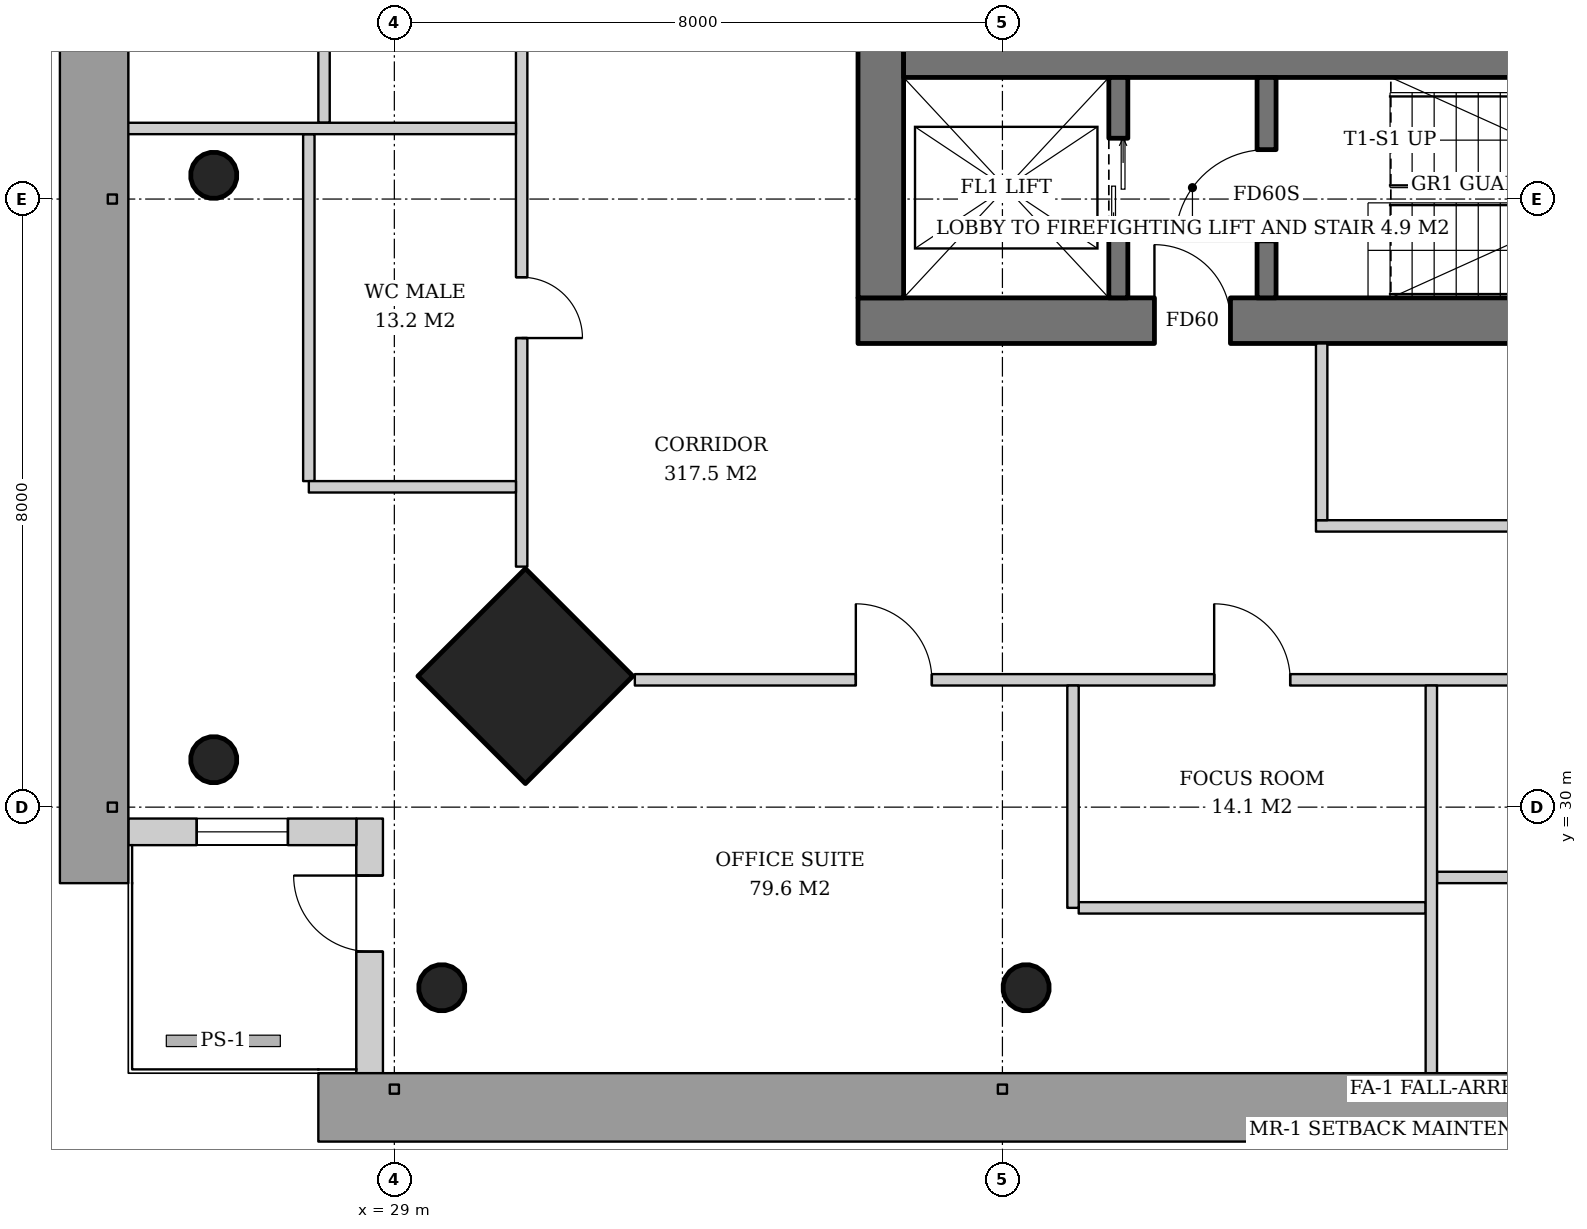
"""IFC4 building model, lengths in metres.
Left out: names, types, materials, properties, quantities, classifications, styles, units other than length and angle.
Written with IfcOpenShell. Run it as: python <this file> out.ifc"""

import sys

from ifc_helpers import new_model, si_unit, direction, frame, frame_2d, origin, origin_2d, place, context, subcontext, project, spatial, rectangle, hollow_circle, extrude, element, fill, save


model = new_model("IFC4")
c1 = context("Model", 3, precision=1e-05, world=origin(), true_north=direction((0.0, 1.0)))
c2 = subcontext(c1, "Body", "Model", "MODEL_VIEW")
j1 = project(units=[si_unit("LENGTHUNIT", "METRE"), si_unit("PLANEANGLEUNIT", "RADIAN")], contexts=[c1])
p1 = place(None, origin())
s1 = spatial("IfcSite", under=j1, at=p1, CompositionType="ELEMENT")
p2 = place(p1, origin())
s2 = spatial("IfcBuilding", under=s1, at=p2, CompositionType="ELEMENT")
p3 = place(p2, frame((0.0, 0.0, 195.8)))
s3 = spatial("IfcBuildingStorey", under=s2, at=p3, CompositionType="ELEMENT", Elevation=195.8)
p4 = place(p3, frame((30.686, 31.686, 0.0), z_axis=(0.031898107953, 0.031898107953, 0.998981992539), x_axis=(-0.707106781187, 0.707106781187, 0.0)))
e1 = element("IfcColumn", 1, at=p4, inside=s3, PredefinedType="COLUMN", context=c2, shape_type="SweptSolid", body=[
    extrude(rectangle(XDim=2.0, YDim=2.0, at=origin_2d()), origin(), (0.0, 0.0, 1.0), 3.804),
])
p5 = place(p3, frame((26.586, 30.586, 0.0), z_axis=(0.031898107953, 0.031898107953, 0.998981992539), x_axis=(-0.707106781187, 0.707106781187, 0.0)))
e2 = element("IfcColumn", 2, at=p5, inside=s3, PredefinedType="COLUMN", context=c2, shape_type="SweptSolid", body=[
    extrude(hollow_circle(Radius=0.305, WallThickness=0.025, at=origin_2d()), origin(), (0.0, 0.0, 1.0), 3.804),
])
p6 = place(p3, frame((26.586, 38.293, 0.0), z_axis=(0.031910302246, 0.015923048203, 0.999363892257), x_axis=(-0.446493300058, 0.894786976326, 0.0)))
e3 = element("IfcColumn", 3, at=p6, inside=s3, PredefinedType="COLUMN", context=c2, shape_type="SweptSolid", body=[
    extrude(hollow_circle(Radius=0.305, WallThickness=0.025, at=origin_2d()), origin(), (0.0, 0.0, 1.0), 3.802),
])
p7 = place(p3, frame((29.586, 27.586, 0.0), z_axis=(0.031898107953, 0.031898107953, 0.998981992539), x_axis=(-0.707106781187, 0.707106781187, 0.0)))
e4 = element("IfcColumn", 4, at=p7, inside=s3, PredefinedType="COLUMN", context=c2, shape_type="SweptSolid", body=[
    extrude(hollow_circle(Radius=0.305, WallThickness=0.025, at=origin_2d()), origin(), (0.0, 0.0, 1.0), 3.804),
])
p8 = place(p3, frame((37.293, 27.586, 0.0), z_axis=(0.015923048203, 0.031910302246, 0.999363892257), x_axis=(-0.894786976326, 0.446493300058, 0.0)))
e5 = element("IfcColumn", 5, at=p8, inside=s3, PredefinedType="COLUMN", context=c2, shape_type="SweptSolid", body=[
    extrude(hollow_circle(Radius=0.305, WallThickness=0.025, at=origin_2d()), origin(), (0.0, 0.0, 1.0), 3.802),
])
p9 = place(p3, frame((35.1, 36.4, 0.0), z_axis=(0.0, 0.0, 1.0), x_axis=(1.0, 0.0, 0.0)))
e6 = element("IfcWall", 6, at=p9, inside=s3, PredefinedType="SHEAR", context=c2, shape_type="SweptSolid", body=[
    extrude(rectangle(XDim=19.8, YDim=0.6, at=frame_2d((9.9, 0.0))), origin(), (0.0, 0.0, 1.0), 3.8),
])
p10 = place(p9, frame((3.9, 0.0, 0.0)))
e7 = element("IfcOpeningElement", 7, at=p10, cuts=e6, PredefinedType="OPENING", context=c2, shape_type="SweptSolid", body=[
    extrude(rectangle(XDim=1.0, YDim=2.1, at=frame_2d((0.5, 1.05))), frame((0.0, 0.31, 0.0), z_axis=(0.0, -1.0, 0.0), x_axis=(1.0, 0.0, 0.0)), (0.0, 0.0, 1.0), 0.62),
])
p11 = place(p9, frame((15.35, 0.0, 0.0)))
e8 = element("IfcOpeningElement", 8, at=p11, cuts=e6, PredefinedType="OPENING", context=c2, shape_type="SweptSolid", body=[
    extrude(rectangle(XDim=1.0, YDim=2.1, at=frame_2d((0.5, 1.05))), frame((0.0, 0.31, 0.0), z_axis=(0.0, -1.0, 0.0), x_axis=(1.0, 0.0, 0.0)), (0.0, 0.0, 1.0), 0.62),
])
p12 = place(p3, frame((35.4, 36.7, 0.0), z_axis=(0.0, 0.0, 1.0), x_axis=(0.0, 1.0, 0.0)))
e9 = element("IfcWall", 9, at=p12, inside=s3, PredefinedType="SHEAR", context=c2, shape_type="SweptSolid", body=[
    extrude(rectangle(XDim=18.6, YDim=0.6, at=frame_2d((9.3, 0.0))), origin(), (0.0, 0.0, 1.0), 3.8),
])
p13 = place(p12, frame((8.4, 0.0, 0.0)))
e10 = element("IfcOpeningElement", 10, at=p13, cuts=e9, PredefinedType="OPENING", context=c2, shape_type="SweptSolid", body=[
    extrude(rectangle(XDim=1.8, YDim=2.4, at=frame_2d((0.9, 1.2))), frame((0.0, 0.31, 0.0), z_axis=(0.0, -1.0, 0.0), x_axis=(1.0, 0.0, 0.0)), (0.0, 0.0, 1.0), 0.62),
])
p14 = place(p3, frame((35.7, 39.8, 0.0), z_axis=(0.0, 0.0, 1.0), x_axis=(1.0, 0.0, 0.0)))
e11 = element("IfcWall", 11, at=p14, inside=s3, PredefinedType="SHEAR", context=c2, shape_type="SweptSolid", body=[
    extrude(rectangle(XDim=18.6, YDim=0.4, at=frame_2d((9.3, 0.0))), origin(), (0.0, 0.0, 1.0), 3.8),
])
p15 = place(p3, frame((28.675, 26.5, 0.0), z_axis=(0.0, 0.0, 1.0), x_axis=(0.0, 1.0, 0.0)))
e12 = element("IfcWall", 12, at=p15, inside=s3, PredefinedType="SOLIDWALL", context=c2, shape_type="SweptSolid", body=[
    extrude(rectangle(XDim=3.35, YDim=0.35, at=frame_2d((1.675, 0.0))), origin(), (0.0, 0.0, 1.0), 3.62),
])
p16 = place(p15, frame((1.6, 0.0, 0.0)))
e13 = element("IfcOpeningElement", 13, at=p16, cuts=e12, PredefinedType="OPENING", context=c2, shape_type="SweptSolid", body=[
    extrude(rectangle(XDim=1.0, YDim=2.4, at=frame_2d((0.5, 1.2))), frame((0.0, 0.185, 0.0), z_axis=(0.0, -1.0, 0.0), x_axis=(1.0, 0.0, 0.0)), (0.0, 0.0, 1.0), 0.37),
])
p17 = place(p3, frame((28.5, 29.675, 0.0), z_axis=(0.0, 0.0, 1.0), x_axis=(-1.0, 0.0, 0.0)))
e14 = element("IfcWall", 14, at=p17, inside=s3, PredefinedType="SOLIDWALL", context=c2, shape_type="SweptSolid", body=[
    extrude(rectangle(XDim=3.0, YDim=0.35, at=frame_2d((1.5, 0.0))), origin(), (0.0, 0.0, 1.0), 3.62),
])
p18 = place(p17, frame((0.9, 0.0, 0.6)))
e15 = element("IfcOpeningElement", 15, at=p18, cuts=e14, PredefinedType="OPENING", context=c2, shape_type="SweptSolid", body=[
    extrude(rectangle(XDim=1.2, YDim=2.55, at=frame_2d((0.6, 1.275))), frame((0.0, 0.185, 0.0), z_axis=(0.0, -1.0, 0.0), x_axis=(1.0, 0.0, 0.0)), (0.0, 0.0, 1.0), 0.37),
])
p19 = place(p3, frame((38.525, 36.7, 0.0), z_axis=(0.0, 0.0, 1.0), x_axis=(0.0, 1.0, 0.0)))
e16 = element("IfcWall", 16, at=p19, inside=s3, PredefinedType="SHEAR", context=c2, shape_type="SweptSolid", body=[
    extrude(rectangle(XDim=2.9, YDim=0.25, at=frame_2d((1.45, 0.0))), origin(), (0.0, 0.0, 1.0), 3.8),
])
p20 = place(p19, frame((0.8, 0.0, 0.0)))
e17 = element("IfcOpeningElement", 17, at=p20, cuts=e16, PredefinedType="OPENING", context=c2, shape_type="SweptSolid", body=[
    extrude(rectangle(XDim=1.3, YDim=2.2, at=frame_2d((0.65, 1.1))), frame((0.0, 0.135, 0.0), z_axis=(0.0, -1.0, 0.0), x_axis=(1.0, 0.0, 0.0)), (0.0, 0.0, 1.0), 0.27),
])
p21 = place(p3, frame((40.475, 36.7, 0.0), z_axis=(0.0, 0.0, 1.0), x_axis=(0.0, 1.0, 0.0)))
e18 = element("IfcWall", 18, at=p21, inside=s3, PredefinedType="SHEAR", context=c2, shape_type="SweptSolid", body=[
    extrude(rectangle(XDim=2.9, YDim=0.25, at=frame_2d((1.45, 0.0))), origin(), (0.0, 0.0, 1.0), 3.8),
])
p22 = place(p21, frame((0.75, 0.0, 0.0)))
e19 = element("IfcOpeningElement", 19, at=p22, cuts=e18, PredefinedType="OPENING", context=c2, shape_type="SweptSolid", body=[
    extrude(rectangle(XDim=1.2, YDim=2.1, at=frame_2d((0.6, 1.05))), frame((0.0, 0.135, 0.0), z_axis=(0.0, -1.0, 0.0), x_axis=(1.0, 0.0, 0.0)), (0.0, 0.0, 1.0), 0.27),
])
p23 = place(p3, frame((41.125, 33.7, 0.0), z_axis=(0.0, 0.0, 1.0), x_axis=(1.0, 0.0, 0.0)))
e20 = element("IfcWall", 20, at=p23, inside=s3, PredefinedType="PARTITIONING", context=c2, shape_type="SweptSolid", body=[
    extrude(rectangle(XDim=8.2, YDim=0.15, at=frame_2d((4.1, 0.0))), origin(), (0.0, 0.0, 1.0), 2.867),
])
p24 = place(p23, frame((3.6, 0.0, 0.0)))
e21 = element("IfcOpeningElement", 21, at=p24, cuts=e20, PredefinedType="OPENING", context=c2, shape_type="SweptSolid", body=[
    extrude(rectangle(XDim=1.0, YDim=2.1, at=frame_2d((0.5, 1.05))), frame((0.0, 0.085, 0.0), z_axis=(0.0, -1.0, 0.0), x_axis=(1.0, 0.0, 0.0)), (0.0, 0.0, 1.0), 0.17),
])
p25 = place(p3, frame((41.2, 36.1, 0.0), z_axis=(0.0, 0.0, 1.0), x_axis=(0.0, -1.0, 0.0)))
e22 = element("IfcWall", 22, at=p25, inside=s3, PredefinedType="PARTITIONING", context=c2, shape_type="SweptSolid", body=[
    extrude(rectangle(XDim=2.325, YDim=0.15, at=frame_2d((1.163, 0.0))), origin(), (0.0, 0.0, 1.0), 3.62),
])
for number, where, z_axis, x_axis in (
    (23, (28.075, 43.568, 0.0), (0.0, 0.0, 1.0), (0.0, -1.0, 0.0)),
    (24, (27.875, 38.854, 0.0), (0.0, 0.0, 1.0), (0.0, -1.0, 0.0)),
):
    element("IfcWall", number, at=place(p3, frame(where, z_axis=z_axis, x_axis=x_axis)), inside=s3, PredefinedType="PARTITIONING", context=c2, shape_type="SweptSolid", body=[
        extrude(rectangle(XDim=4.564, YDim=0.15, at=frame_2d((2.282, 0.0))), origin(), (0.0, 0.0, 1.0), 2.867),
    ])
p26 = place(p3, frame((30.675, 58.836, 0.0), z_axis=(0.0, 0.0, 1.0), x_axis=(0.0, -1.0, 0.0)))
e25 = element("IfcWall", 25, at=p26, inside=s3, PredefinedType="PARTITIONING", context=c2, shape_type="SweptSolid", body=[
    extrude(rectangle(XDim=25.671, YDim=0.15, at=frame_2d((12.836, 0.0))), origin(), (0.0, 0.0, 1.0), 2.867),
])
p27 = place(p26, frame((2.907, 0.0, 0.0)))
e26 = element("IfcOpeningElement", 26, at=p27, cuts=e25, PredefinedType="OPENING", context=c2, shape_type="SweptSolid", body=[
    extrude(rectangle(XDim=1.0, YDim=2.1, at=frame_2d((0.5, 1.05))), frame((0.0, 0.085, 0.0), z_axis=(0.0, -1.0, 0.0), x_axis=(1.0, 0.0, 0.0)), (0.0, 0.0, 1.0), 0.17),
])
p28 = place(p26, frame((7.622, 0.0, 0.0)))
e27 = element("IfcOpeningElement", 27, at=p28, cuts=e25, PredefinedType="OPENING", context=c2, shape_type="SweptSolid", body=[
    extrude(rectangle(XDim=1.0, YDim=2.1, at=frame_2d((0.5, 1.05))), frame((0.0, 0.085, 0.0), z_axis=(0.0, -1.0, 0.0), x_axis=(1.0, 0.0, 0.0)), (0.0, 0.0, 1.0), 0.17),
])
p29 = place(p26, frame((12.436, 0.0, 0.0)))
e28 = element("IfcOpeningElement", 28, at=p29, cuts=e25, PredefinedType="OPENING", context=c2, shape_type="SweptSolid", body=[
    extrude(rectangle(XDim=0.8, YDim=2.1, at=frame_2d((0.4, 1.05))), frame((0.0, 0.085, 0.0), z_axis=(0.0, -1.0, 0.0), x_axis=(1.0, 0.0, 0.0)), (0.0, 0.0, 1.0), 0.17),
])
p30 = place(p26, frame((17.05, 0.0, 0.0)))
e29 = element("IfcOpeningElement", 29, at=p30, cuts=e25, PredefinedType="OPENING", context=c2, shape_type="SweptSolid", body=[
    extrude(rectangle(XDim=1.0, YDim=2.1, at=frame_2d((0.5, 1.05))), frame((0.0, 0.085, 0.0), z_axis=(0.0, -1.0, 0.0), x_axis=(1.0, 0.0, 0.0)), (0.0, 0.0, 1.0), 0.17),
])
p31 = place(p26, frame((21.864, 0.0, 0.0)))
e30 = element("IfcOpeningElement", 30, at=p31, cuts=e25, PredefinedType="OPENING", context=c2, shape_type="SweptSolid", body=[
    extrude(rectangle(XDim=0.8, YDim=2.1, at=frame_2d((0.4, 1.05))), frame((0.0, 0.085, 0.0), z_axis=(0.0, -1.0, 0.0), x_axis=(1.0, 0.0, 0.0)), (0.0, 0.0, 1.0), 0.17),
])
p32 = place(p3, frame((30.6, 38.928, 0.0), z_axis=(0.0, 0.0, 1.0), x_axis=(-1.0, 0.0, 0.0)))
e31 = element("IfcWall", 31, at=p32, inside=s3, PredefinedType="PARTITIONING", context=c2, shape_type="SweptSolid", body=[
    extrude(rectangle(XDim=5.14, YDim=0.15, at=frame_2d((2.57, 0.0))), origin(), (0.0, 0.0, 1.0), 3.12),
])
p33 = place(p3, frame((30.6, 34.214, 0.0), z_axis=(0.0, 0.0, 1.0), x_axis=(-1.0, 0.0, 0.0)))
e32 = element("IfcWall", 32, at=p33, inside=s3, PredefinedType="PARTITIONING", context=c2, shape_type="SweptSolid", body=[
    extrude(rectangle(XDim=2.725, YDim=0.15, at=frame_2d((1.363, 0.0))), origin(), (0.0, 0.0, 1.0), 3.62),
])
p34 = place(p3, frame((38.004, 28.675, 0.0), z_axis=(0.0, 0.0, 1.0), x_axis=(1.0, 0.0, 0.0)))
e33 = element("IfcWall", 33, at=p34, inside=s3, PredefinedType="PARTITIONING", context=c2, shape_type="SweptSolid", body=[
    extrude(rectangle(XDim=4.564, YDim=0.15, at=frame_2d((2.282, 0.0))), origin(), (0.0, 0.0, 1.0), 2.867),
])
p35 = place(p3, frame((42.718, 29.075, 0.0), z_axis=(0.0, 0.0, 1.0), x_axis=(1.0, 0.0, 0.0)))
e34 = element("IfcWall", 34, at=p35, inside=s3, PredefinedType="PARTITIONING", context=c2, shape_type="SweptSolid", body=[
    extrude(rectangle(XDim=4.564, YDim=0.15, at=frame_2d((2.282, 0.0))), origin(), (0.0, 0.0, 1.0), 2.867),
])
p36 = place(p3, frame((32.164, 31.675, 0.0), z_axis=(0.0, 0.0, 1.0), x_axis=(1.0, 0.0, 0.0)))
e35 = element("IfcWall", 35, at=p36, inside=s3, PredefinedType="PARTITIONING", context=c2, shape_type="SweptSolid", body=[
    extrude(rectangle(XDim=25.671, YDim=0.15, at=frame_2d((12.836, 0.0))), origin(), (0.0, 0.0, 1.0), 2.867),
])
p37 = place(p36, frame((2.907, 0.0, 0.0)))
e36 = element("IfcOpeningElement", 36, at=p37, cuts=e35, PredefinedType="OPENING", context=c2, shape_type="SweptSolid", body=[
    extrude(rectangle(XDim=1.0, YDim=2.1, at=frame_2d((0.5, 1.05))), frame((0.0, 0.085, 0.0), z_axis=(0.0, -1.0, 0.0), x_axis=(1.0, 0.0, 0.0)), (0.0, 0.0, 1.0), 0.17),
])
p38 = place(p36, frame((7.622, 0.0, 0.0)))
e37 = element("IfcOpeningElement", 37, at=p38, cuts=e35, PredefinedType="OPENING", context=c2, shape_type="SweptSolid", body=[
    extrude(rectangle(XDim=1.0, YDim=2.1, at=frame_2d((0.5, 1.05))), frame((0.0, 0.085, 0.0), z_axis=(0.0, -1.0, 0.0), x_axis=(1.0, 0.0, 0.0)), (0.0, 0.0, 1.0), 0.17),
])
p39 = place(p36, frame((12.336, 0.0, 0.0)))
e38 = element("IfcOpeningElement", 38, at=p39, cuts=e35, PredefinedType="OPENING", context=c2, shape_type="SweptSolid", body=[
    extrude(rectangle(XDim=1.0, YDim=2.1, at=frame_2d((0.5, 1.05))), frame((0.0, 0.085, 0.0), z_axis=(0.0, -1.0, 0.0), x_axis=(1.0, 0.0, 0.0)), (0.0, 0.0, 1.0), 0.17),
])
p40 = place(p36, frame((17.05, 0.0, 0.0)))
e39 = element("IfcOpeningElement", 39, at=p40, cuts=e35, PredefinedType="OPENING", context=c2, shape_type="SweptSolid", body=[
    extrude(rectangle(XDim=1.0, YDim=2.1, at=frame_2d((0.5, 1.05))), frame((0.0, 0.085, 0.0), z_axis=(0.0, -1.0, 0.0), x_axis=(1.0, 0.0, 0.0)), (0.0, 0.0, 1.0), 0.17),
])
p41 = place(p36, frame((21.764, 0.0, 0.0)))
e40 = element("IfcOpeningElement", 40, at=p41, cuts=e35, PredefinedType="OPENING", context=c2, shape_type="SweptSolid", body=[
    extrude(rectangle(XDim=1.0, YDim=2.1, at=frame_2d((0.5, 1.05))), frame((0.0, 0.085, 0.0), z_axis=(0.0, -1.0, 0.0), x_axis=(1.0, 0.0, 0.0)), (0.0, 0.0, 1.0), 0.17),
])
p42 = place(p3, frame((37.928, 31.6, 0.0), z_axis=(0.0, 0.0, 1.0), x_axis=(0.0, -1.0, 0.0)))
e41 = element("IfcWall", 41, at=p42, inside=s3, PredefinedType="PARTITIONING", context=c2, shape_type="SweptSolid", body=[
    extrude(rectangle(XDim=2.925, YDim=0.15, at=frame_2d((1.462, 0.0))), origin(), (0.0, 0.0, 1.0), 3.62),
])
p43 = place(p3, frame((42.643, 31.6, 0.0), z_axis=(0.0, 0.0, 1.0), x_axis=(0.0, -1.0, 0.0)))
e42 = element("IfcWall", 42, at=p43, inside=s3, PredefinedType="PARTITIONING", context=c2, shape_type="SweptSolid", body=[
    extrude(rectangle(XDim=5.14, YDim=0.15, at=frame_2d((2.57, 0.0))), origin(), (0.0, 0.0, 1.0), 3.12),
])
p44 = place(p16, origin())
e43 = element("IfcDoor", 43, at=p44, inside=s3, OperationType="SINGLE_SWING_RIGHT", PredefinedType="DOOR", context=c2, shape_type="SweptSolid", body=[
    extrude(rectangle(XDim=1.0, YDim=2.4, at=frame_2d((0.5, 1.2))), frame((0.0, 0.025, 0.0), z_axis=(0.0, -1.0, 0.0), x_axis=(1.0, 0.0, 0.0)), (0.0, 0.0, 1.0), 0.05),
])
fill(e13, e43)
p45 = place(p18, origin())
e44 = element("IfcWindow", 44, at=p45, inside=s3, PartitioningType="SINGLE_PANEL", PredefinedType="WINDOW", context=c2, shape_type="SweptSolid", body=[
    extrude(rectangle(XDim=1.2, YDim=2.55, at=frame_2d((0.6, 1.275))), frame((0.0, 0.03, 0.0), z_axis=(0.0, -1.0, 0.0), x_axis=(1.0, 0.0, 0.0)), (0.0, 0.0, 1.0), 0.06),
])
fill(e15, e44)
p46 = place(p20, origin())
e45 = element("IfcDoor", 45, at=p46, inside=s3, OperationType="DOUBLE_DOOR_SLIDING", PredefinedType="DOOR", context=c2, shape_type="SweptSolid", body=[
    extrude(rectangle(XDim=1.3, YDim=2.2, at=frame_2d((0.65, 1.1))), frame((0.0, 0.025, 0.0), z_axis=(0.0, -1.0, 0.0), x_axis=(1.0, 0.0, 0.0)), (0.0, 0.0, 1.0), 0.05),
])
fill(e17, e45)
p47 = place(p22, origin())
e46 = element("IfcDoor", 46, at=p47, inside=s3, OperationType="SINGLE_SWING_LEFT", PredefinedType="DOOR", context=c2, shape_type="SweptSolid", body=[
    extrude(rectangle(XDim=1.2, YDim=2.1, at=frame_2d((0.6, 1.05))), frame((0.0, 0.025, 0.0), z_axis=(0.0, -1.0, 0.0), x_axis=(1.0, 0.0, 0.0)), (0.0, 0.0, 1.0), 0.05),
])
fill(e19, e46)
p48 = place(p10, origin())
e47 = element("IfcDoor", 47, at=p48, inside=s3, OperationType="SINGLE_SWING_LEFT", PredefinedType="DOOR", context=c2, shape_type="SweptSolid", body=[
    extrude(rectangle(XDim=1.0, YDim=2.1, at=frame_2d((0.5, 1.05))), frame((0.0, 0.025, 0.0), z_axis=(0.0, -1.0, 0.0), x_axis=(1.0, 0.0, 0.0)), (0.0, 0.0, 1.0), 0.05),
])
fill(e7, e47)
p49 = place(p31, origin())
e48 = element("IfcDoor", 48, at=p49, inside=s3, OperationType="SINGLE_SWING_RIGHT", PredefinedType="DOOR", context=c2, shape_type="SweptSolid", body=[
    extrude(rectangle(XDim=0.8, YDim=2.1, at=frame_2d((0.4, 1.05))), frame((0.0, 0.025, 0.0), z_axis=(0.0, -1.0, 0.0), x_axis=(1.0, 0.0, 0.0)), (0.0, 0.0, 1.0), 0.05),
])
fill(e30, e48)
p50 = place(p37, origin())
e49 = element("IfcDoor", 49, at=p50, inside=s3, OperationType="SINGLE_SWING_LEFT", PredefinedType="DOOR", context=c2, shape_type="SweptSolid", body=[
    extrude(rectangle(XDim=1.0, YDim=2.1, at=frame_2d((0.5, 1.05))), frame((0.0, 0.025, 0.0), z_axis=(0.0, -1.0, 0.0), x_axis=(1.0, 0.0, 0.0)), (0.0, 0.0, 1.0), 0.05),
])
fill(e36, e49)
p51 = place(p38, origin())
e50 = element("IfcDoor", 50, at=p51, inside=s3, OperationType="SINGLE_SWING_LEFT", PredefinedType="DOOR", context=c2, shape_type="SweptSolid", body=[
    extrude(rectangle(XDim=1.0, YDim=2.1, at=frame_2d((0.5, 1.05))), frame((0.0, 0.025, 0.0), z_axis=(0.0, -1.0, 0.0), x_axis=(1.0, 0.0, 0.0)), (0.0, 0.0, 1.0), 0.05),
])
fill(e37, e50)
save(model, sys.argv[1])
